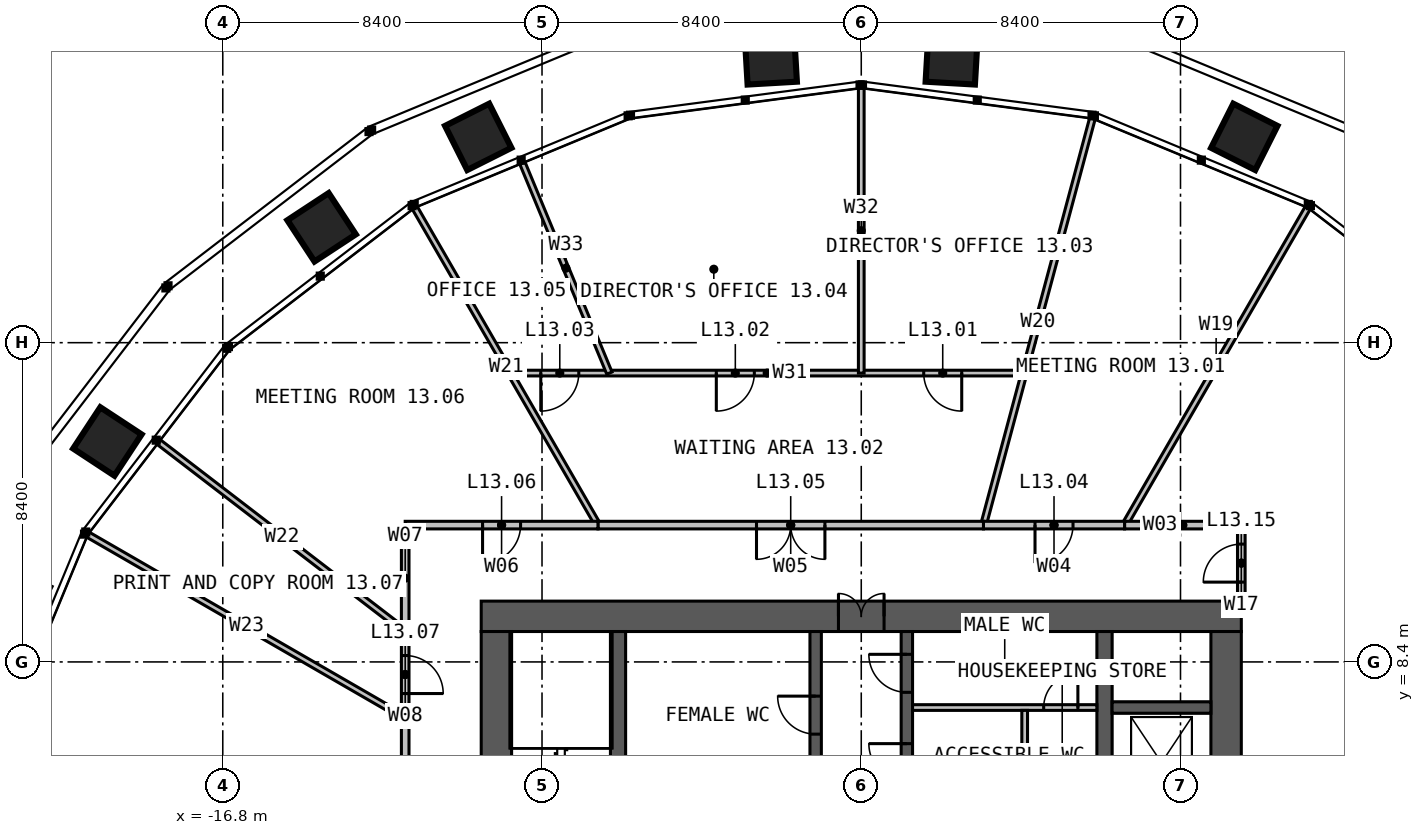
"""IFC4 building model, lengths in metres.
Left out: names, types, materials, properties, quantities, classifications, styles, units other than length and angle.
Written with IfcOpenShell. Run it as: python <this file> out.ifc"""

import sys

from ifc_helpers import new_model, si_unit, direction, frame, frame_2d, origin, place, context, subcontext, project, spatial, rectangle, extrude, element, fill, save


model = new_model("IFC4")
c1 = context("Model", 3, precision=1e-05, world=origin(), true_north=direction((0.0, 1.0)))
c2 = subcontext(c1, "Body", "Model", "MODEL_VIEW")
j1 = project(units=[si_unit("LENGTHUNIT", "METRE"), si_unit("PLANEANGLEUNIT", "RADIAN")], contexts=[c1])
p1 = place(None, origin())
s1 = spatial("IfcSite", under=j1, at=p1, CompositionType="ELEMENT")
p2 = place(p1, origin())
s2 = spatial("IfcBuilding", under=s1, at=p2, CompositionType="ELEMENT")
p3 = place(p2, frame((0.0, 0.0, 57.0)))
s3 = spatial("IfcBuildingStorey", under=s2, at=p3, CompositionType="ELEMENT", Elevation=57.0)
p4 = place(p3, frame((-10.0, 9.6, 0.0), z_axis=(0.0, 0.0, 1.0), x_axis=(1.0, 0.0, 0.0)))
e1 = element("IfcWall", 1, at=p4, inside=s3, PredefinedType="SOLIDWALL", context=c2, shape_type="SweptSolid", body=[
    extrude(rectangle(XDim=20.0, YDim=0.8, at=frame_2d((10.0, 0.0))), origin(), (0.0, 0.0, 1.0), 4.0),
])
p5 = place(p4, frame((9.4, 0.0, 0.0)))
e2 = element("IfcOpeningElement", 2, at=p5, cuts=e1, PredefinedType="OPENING", context=c2, shape_type="SweptSolid", body=[
    extrude(rectangle(XDim=1.2, YDim=2.2, at=frame_2d((0.6, 1.1))), frame((0.0, 0.41, 0.0), z_axis=(0.0, -1.0, 0.0), x_axis=(1.0, 0.0, 0.0)), (0.0, 0.0, 1.0), 0.82),
])
for number, where, z_axis, x_axis in (
    (3, (9.6, -9.2, 0.0), (0.0, 0.0, 1.0), (0.0, 1.0, 0.0)),
    (4, (-9.6, 9.2, 0.0), (0.0, 0.0, 1.0), (0.0, -1.0, 0.0)),
):
    element("IfcWall", number, at=place(p3, frame(where, z_axis=z_axis, x_axis=x_axis)), inside=s3, PredefinedType="SOLIDWALL", context=c2, shape_type="SweptSolid", body=[
        extrude(rectangle(XDim=18.4, YDim=0.8, at=frame_2d((9.2, 0.0))), origin(), (0.0, 0.0, 1.0), 4.0),
    ])
p6 = place(p3, frame((-6.4, -9.2, 0.0), z_axis=(0.0, 0.0, 1.0), x_axis=(0.0, 1.0, 0.0)))
e5 = element("IfcWall", 5, at=p6, inside=s3, PredefinedType="SOLIDWALL", context=c2, shape_type="SweptSolid", body=[
    extrude(rectangle(XDim=18.4, YDim=0.4, at=frame_2d((9.2, 0.0))), origin(), (0.0, 0.0, 1.0), 4.0),
])
p7 = place(p6, frame((8.7, 0.0, 0.0)))
e6 = element("IfcOpeningElement", 6, at=p7, cuts=e5, PredefinedType="OPENING", context=c2, shape_type="SweptSolid", body=[
    extrude(rectangle(XDim=1.0, YDim=2.2, at=frame_2d((0.5, 1.1))), frame((0.0, 0.21, 0.0), z_axis=(0.0, -1.0, 0.0), x_axis=(1.0, 0.0, 0.0)), (0.0, 0.0, 1.0), 0.42),
])
p8 = place(p3, frame((6.4, 9.2, 0.0), z_axis=(0.0, 0.0, 1.0), x_axis=(0.0, -1.0, 0.0)))
e7 = element("IfcWall", 7, at=p8, inside=s3, PredefinedType="SOLIDWALL", context=c2, shape_type="SweptSolid", body=[
    extrude(rectangle(XDim=18.4, YDim=0.4, at=frame_2d((9.2, 0.0))), origin(), (0.0, 0.0, 1.0), 4.0),
])
p9 = place(p8, frame((8.7, 0.0, 0.0)))
e8 = element("IfcOpeningElement", 8, at=p9, cuts=e7, PredefinedType="OPENING", context=c2, shape_type="SweptSolid", body=[
    extrude(rectangle(XDim=1.0, YDim=2.2, at=frame_2d((0.5, 1.1))), frame((0.0, 0.21, 0.0), z_axis=(0.0, -1.0, 0.0), x_axis=(1.0, 0.0, 0.0)), (0.0, 0.0, 1.0), 0.42),
])
p10 = place(p3, frame((-1.2, 1.45, 0.0), z_axis=(0.0, 0.0, 1.0), x_axis=(0.0, 1.0, 0.0)))
e9 = element("IfcWall", 9, at=p10, inside=s3, PredefinedType="SOLIDWALL", context=c2, shape_type="SweptSolid", body=[
    extrude(rectangle(XDim=7.75, YDim=0.3, at=frame_2d((3.875, 0.0))), origin(), (0.0, 0.0, 1.0), 4.0),
])
p11 = place(p10, frame((5.05, 0.0, 0.0)))
e10 = element("IfcOpeningElement", 10, at=p11, cuts=e9, PredefinedType="OPENING", context=c2, shape_type="SweptSolid", body=[
    extrude(rectangle(XDim=1.0, YDim=2.2, at=frame_2d((0.5, 1.1))), frame((0.0, 0.16, 0.0), z_axis=(0.0, -1.0, 0.0), x_axis=(1.0, 0.0, 0.0)), (0.0, 0.0, 1.0), 0.32),
])
p12 = place(p3, frame((1.2, 1.45, 0.0), z_axis=(0.0, 0.0, 1.0), x_axis=(0.0, 1.0, 0.0)))
e11 = element("IfcWall", 11, at=p12, inside=s3, PredefinedType="SOLIDWALL", context=c2, shape_type="SweptSolid", body=[
    extrude(rectangle(XDim=7.75, YDim=0.3, at=frame_2d((3.875, 0.0))), origin(), (0.0, 0.0, 1.0), 4.0),
])
p13 = place(p12, frame((3.8, 0.0, 0.0)))
e12 = element("IfcOpeningElement", 12, at=p13, cuts=e11, PredefinedType="OPENING", context=c2, shape_type="SweptSolid", body=[
    extrude(rectangle(XDim=1.0, YDim=2.2, at=frame_2d((0.5, 1.1))), frame((0.0, 0.16, 0.0), z_axis=(0.0, -1.0, 0.0), x_axis=(1.0, 0.0, 0.0)), (0.0, 0.0, 1.0), 0.32),
])
p14 = place(p12, frame((6.15, 0.0, 0.0)))
e13 = element("IfcOpeningElement", 13, at=p14, cuts=e11, PredefinedType="OPENING", context=c2, shape_type="SweptSolid", body=[
    extrude(rectangle(XDim=1.0, YDim=2.2, at=frame_2d((0.5, 1.1))), frame((0.0, 0.16, 0.0), z_axis=(0.0, -1.0, 0.0), x_axis=(1.0, 0.0, 0.0)), (0.0, 0.0, 1.0), 0.32),
])
p15 = place(p3, frame((6.6, 7.2, 0.0), z_axis=(0.0, 0.0, 1.0), x_axis=(1.0, 0.0, 0.0)))
e14 = element("IfcWall", 14, at=p15, inside=s3, PredefinedType="SOLIDWALL", context=c2, shape_type="SweptSolid", body=[
    extrude(rectangle(XDim=2.6, YDim=0.3, at=frame_2d((1.3, 0.0))), origin(), (0.0, 0.0, 1.0), 4.0),
])
p16 = place(p3, frame((1.35, 7.2, 0.0), z_axis=(0.0, 0.0, 1.0), x_axis=(1.0, 0.0, 0.0)))
e15 = element("IfcWall", 15, at=p16, inside=s3, PredefinedType="PARTITIONING", context=c2, shape_type="SweptSolid", body=[
    extrude(rectangle(XDim=4.85, YDim=0.15, at=frame_2d((2.425, 0.0))), origin(), (0.0, 0.0, 1.0), 3.75),
])
p17 = place(p16, frame((3.45, 0.0, 0.0)))
e16 = element("IfcOpeningElement", 16, at=p17, cuts=e15, PredefinedType="OPENING", context=c2, shape_type="SweptSolid", body=[
    extrude(rectangle(XDim=0.9, YDim=2.2, at=frame_2d((0.45, 1.1))), frame((0.0, 0.085, 0.0), z_axis=(0.0, -1.0, 0.0), x_axis=(1.0, 0.0, 0.0)), (0.0, 0.0, 1.0), 0.17),
])
p18 = place(p3, frame((4.3, 4.75, 0.0), z_axis=(0.0, 0.0, 1.0), x_axis=(0.0, 1.0, 0.0)))
e17 = element("IfcWall", 17, at=p18, inside=s3, PredefinedType="PARTITIONING", context=c2, shape_type="SweptSolid", body=[
    extrude(rectangle(XDim=2.375, YDim=0.15, at=frame_2d((1.188, 0.0))), origin(), (0.0, 0.0, 1.0), 3.75),
])
p19 = place(p3, frame((6.928, 12.0, 0.0), z_axis=(0.0, 0.0, 1.0), x_axis=(0.499991431567, 0.866030350715, 0.0)))
e18 = element("IfcWall", 18, at=p19, inside=s3, PredefinedType="PARTITIONING", context=c2, shape_type="SweptSolid", body=[
    extrude(rectangle(XDim=9.638, YDim=0.15, at=frame_2d((4.819, 0.0))), origin(), (0.0, 0.0, 1.0), 2.79),
])
p20 = place(p3, frame((3.215, 12.0, 0.0), z_axis=(0.0, 0.0, 1.0), x_axis=(0.258830514209, 0.965922753078, 0.0)))
e19 = element("IfcWall", 19, at=p20, inside=s3, PredefinedType="PARTITIONING", context=c2, shape_type="SweptSolid", body=[
    extrude(rectangle(XDim=11.071, YDim=0.15, at=frame_2d((5.535, 0.0))), origin(), (0.0, 0.0, 1.0), 2.79),
])
p21 = place(p3, frame((-6.928, 12.0, 0.0), z_axis=(0.0, 0.0, 1.0), x_axis=(-0.499991431567, 0.866030350715, 0.0)))
e20 = element("IfcWall", 20, at=p21, inside=s3, PredefinedType="PARTITIONING", context=c2, shape_type="SweptSolid", body=[
    extrude(rectangle(XDim=9.638, YDim=0.15, at=frame_2d((4.819, 0.0))), origin(), (0.0, 0.0, 1.0), 2.79),
])
p22 = place(p3, frame((-12.0, 9.208, 0.0), z_axis=(0.0, 0.0, 1.0), x_axis=(-0.793362371633, 0.608749658954, 0.0)))
e21 = element("IfcWall", 21, at=p22, inside=s3, PredefinedType="PARTITIONING", context=c2, shape_type="SweptSolid", body=[
    extrude(rectangle(XDim=8.167, YDim=0.15, at=frame_2d((4.084, 0.0))), origin(), (0.0, 0.0, 1.0), 2.79),
])
p23 = place(p3, frame((-12.0, 6.928, 0.0), z_axis=(0.0, 0.0, 1.0), x_axis=(-0.866030350715, 0.499991431567, 0.0)))
e22 = element("IfcWall", 22, at=p23, inside=s3, PredefinedType="PARTITIONING", context=c2, shape_type="SweptSolid", body=[
    extrude(rectangle(XDim=9.638, YDim=0.15, at=frame_2d((4.819, 0.0))), origin(), (0.0, 0.0, 1.0), 2.79),
])
p24 = place(p3, frame((10.0, 12.0, 0.0), z_axis=(0.0, 0.0, 1.0), x_axis=(-1.0, 0.0, 0.0)))
e23 = element("IfcWall", 23, at=p24, inside=s3, PredefinedType="PARTITIONING", context=c2, shape_type="SweptSolid", body=[
    extrude(rectangle(XDim=3.072, YDim=0.2, at=frame_2d((1.536, 0.0))), origin(), (0.0, 0.0, 1.0), 3.8),
])
p25 = place(p3, frame((6.928, 12.0, 0.0), z_axis=(0.0, 0.0, 1.0), x_axis=(-1.0, 0.0, 0.0)))
e24 = element("IfcWall", 24, at=p25, inside=s3, PredefinedType="PARTITIONING", context=c2, shape_type="SweptSolid", body=[
    extrude(rectangle(XDim=3.713, YDim=0.2, at=frame_2d((1.856, 0.0))), origin(), (0.0, 0.0, 1.0), 3.8),
])
p26 = place(p25, frame((1.356, 0.0, 0.0)))
e25 = element("IfcOpeningElement", 25, at=p26, cuts=e24, PredefinedType="OPENING", context=c2, shape_type="SweptSolid", body=[
    extrude(rectangle(XDim=1.0, YDim=2.2, at=frame_2d((0.5, 1.1))), frame((0.0, 0.11, 0.0), z_axis=(0.0, -1.0, 0.0), x_axis=(1.0, 0.0, 0.0)), (0.0, 0.0, 1.0), 0.22),
])
p27 = place(p3, frame((4.287, 16.0, 0.0), z_axis=(0.0, 0.0, 1.0), x_axis=(-1.0, 0.0, 0.0)))
e26 = element("IfcWall", 26, at=p27, inside=s3, PredefinedType="PARTITIONING", context=c2, shape_type="SweptSolid", body=[
    extrude(rectangle(XDim=13.525, YDim=0.15, at=frame_2d((6.762, 0.0))), origin(), (0.0, 0.0, 1.0), 2.79),
])
p28 = place(p27, frame((1.644, 0.0, 0.0)))
e27 = element("IfcOpeningElement", 27, at=p28, cuts=e26, PredefinedType="OPENING", context=c2, shape_type="SweptSolid", body=[
    extrude(rectangle(XDim=1.0, YDim=2.2, at=frame_2d((0.5, 1.1))), frame((0.0, 0.085, 0.0), z_axis=(0.0, -1.0, 0.0), x_axis=(1.0, 0.0, 0.0)), (0.0, 0.0, 1.0), 0.17),
])
p29 = place(p27, frame((7.101, 0.0, 0.0)))
e28 = element("IfcOpeningElement", 28, at=p29, cuts=e26, PredefinedType="OPENING", context=c2, shape_type="SweptSolid", body=[
    extrude(rectangle(XDim=1.0, YDim=2.2, at=frame_2d((0.5, 1.1))), frame((0.0, 0.085, 0.0), z_axis=(0.0, -1.0, 0.0), x_axis=(1.0, 0.0, 0.0)), (0.0, 0.0, 1.0), 0.17),
])
p30 = place(p27, frame((11.72, 0.0, 0.0)))
e29 = element("IfcOpeningElement", 29, at=p30, cuts=e26, PredefinedType="OPENING", context=c2, shape_type="SweptSolid", body=[
    extrude(rectangle(XDim=1.0, YDim=2.2, at=frame_2d((0.5, 1.1))), frame((0.0, 0.085, 0.0), z_axis=(0.0, -1.0, 0.0), x_axis=(1.0, 0.0, 0.0)), (0.0, 0.0, 1.0), 0.17),
])
p31 = place(p3, frame((0.0, 16.0, 0.0), z_axis=(0.0, 0.0, 1.0), x_axis=(0.0, 1.0, 0.0)))
e30 = element("IfcWall", 30, at=p31, inside=s3, PredefinedType="PARTITIONING", context=c2, shape_type="SweptSolid", body=[
    extrude(rectangle(XDim=7.494, YDim=0.15, at=frame_2d((3.747, 0.0))), origin(), (0.0, 0.0, 1.0), 2.79),
])
p32 = place(p3, frame((-6.627, 16.0, 0.0), z_axis=(0.0, 0.0, 1.0), x_axis=(-0.382670574825, 0.923884858174, 0.0)))
e31 = element("IfcWall", 31, at=p32, inside=s3, PredefinedType="PARTITIONING", context=c2, shape_type="SweptSolid", body=[
    extrude(rectangle(XDim=5.975, YDim=0.15, at=frame_2d((2.987, 0.0))), origin(), (0.0, 0.0, 1.0), 2.79),
])
p33 = place(p3, frame((3.215, 12.0, 0.0), z_axis=(0.0, 0.0, 1.0), x_axis=(-1.0, 0.0, 0.0)))
e32 = element("IfcWall", 32, at=p33, inside=s3, PredefinedType="PARTITIONING", context=c2, shape_type="SweptSolid", body=[
    extrude(rectangle(XDim=10.144, YDim=0.2, at=frame_2d((5.072, 0.0))), origin(), (0.0, 0.0, 1.0), 3.8),
])
p34 = place(p33, frame((4.172, 0.0, 0.0)))
e33 = element("IfcOpeningElement", 33, at=p34, cuts=e32, PredefinedType="OPENING", context=c2, shape_type="SweptSolid", body=[
    extrude(rectangle(XDim=1.8, YDim=2.2, at=frame_2d((0.9, 1.1))), frame((0.0, 0.11, 0.0), z_axis=(0.0, -1.0, 0.0), x_axis=(1.0, 0.0, 0.0)), (0.0, 0.0, 1.0), 0.22),
])
p35 = place(p3, frame((-6.928, 12.0, 0.0), z_axis=(0.0, 0.0, 1.0), x_axis=(-1.0, 0.0, 0.0)))
e34 = element("IfcWall", 34, at=p35, inside=s3, PredefinedType="PARTITIONING", context=c2, shape_type="SweptSolid", body=[
    extrude(rectangle(XDim=5.072, YDim=0.2, at=frame_2d((2.536, 0.0))), origin(), (0.0, 0.0, 1.0), 3.8),
])
p36 = place(p35, frame((2.036, 0.0, 0.0)))
e35 = element("IfcOpeningElement", 35, at=p36, cuts=e34, PredefinedType="OPENING", context=c2, shape_type="SweptSolid", body=[
    extrude(rectangle(XDim=1.0, YDim=2.2, at=frame_2d((0.5, 1.1))), frame((0.0, 0.11, 0.0), z_axis=(0.0, -1.0, 0.0), x_axis=(1.0, 0.0, 0.0)), (0.0, 0.0, 1.0), 0.22),
])
p37 = place(p3, frame((-12.0, 12.0, 0.0), z_axis=(0.0, 0.0, 1.0), x_axis=(0.0, -1.0, 0.0)))
e36 = element("IfcWall", 36, at=p37, inside=s3, PredefinedType="PARTITIONING", context=c2, shape_type="SweptSolid", body=[
    extrude(rectangle(XDim=2.792, YDim=0.2, at=frame_2d((1.396, 0.0))), origin(), (0.0, 0.0, 1.0), 3.8),
])
p38 = place(p3, frame((-12.0, 9.208, 0.0), z_axis=(0.0, 0.0, 1.0), x_axis=(0.0, -1.0, 0.0)))
e37 = element("IfcWall", 37, at=p38, inside=s3, PredefinedType="PARTITIONING", context=c2, shape_type="SweptSolid", body=[
    extrude(rectangle(XDim=2.28, YDim=0.2, at=frame_2d((1.14, 0.0))), origin(), (0.0, 0.0, 1.0), 3.8),
])
p39 = place(p38, frame((0.64, 0.0, 0.0)))
e38 = element("IfcOpeningElement", 38, at=p39, cuts=e37, PredefinedType="OPENING", context=c2, shape_type="SweptSolid", body=[
    extrude(rectangle(XDim=1.0, YDim=2.2, at=frame_2d((0.5, 1.1))), frame((0.0, 0.11, 0.0), z_axis=(0.0, -1.0, 0.0), x_axis=(1.0, 0.0, 0.0)), (0.0, 0.0, 1.0), 0.22),
])
p40 = place(p3, frame((-12.0, 6.928, 0.0), z_axis=(0.0, 0.0, 1.0), x_axis=(0.0, -1.0, 0.0)))
e39 = element("IfcWall", 39, at=p40, inside=s3, PredefinedType="PARTITIONING", context=c2, shape_type="SweptSolid", body=[
    extrude(rectangle(XDim=8.508, YDim=0.2, at=frame_2d((4.254, 0.0))), origin(), (0.0, 0.0, 1.0), 3.8),
])
p41 = place(p40, frame((3.754, 0.0, 0.0)))
e40 = element("IfcOpeningElement", 40, at=p41, cuts=e39, PredefinedType="OPENING", context=c2, shape_type="SweptSolid", body=[
    extrude(rectangle(XDim=1.0, YDim=2.2, at=frame_2d((0.5, 1.1))), frame((0.0, 0.11, 0.0), z_axis=(0.0, -1.0, 0.0), x_axis=(1.0, 0.0, 0.0)), (0.0, 0.0, 1.0), 0.22),
])
p42 = place(p3, frame((10.0, 10.0, 0.0), z_axis=(0.0, 0.0, 1.0), x_axis=(0.0, 1.0, 0.0)))
e41 = element("IfcWall", 41, at=p42, inside=s3, PredefinedType="PARTITIONING", context=c2, shape_type="SweptSolid", body=[
    extrude(rectangle(XDim=2.0, YDim=0.2, at=frame_2d((1.0, 0.0))), origin(), (0.0, 0.0, 1.0), 3.8),
])
p43 = place(p42, frame((0.5, 0.0, 0.0)))
e42 = element("IfcOpeningElement", 42, at=p43, cuts=e41, PredefinedType="OPENING", context=c2, shape_type="SweptSolid", body=[
    extrude(rectangle(XDim=1.0, YDim=2.2, at=frame_2d((0.5, 1.1))), frame((0.0, 0.11, 0.0), z_axis=(0.0, -1.0, 0.0), x_axis=(1.0, 0.0, 0.0)), (0.0, 0.0, 1.0), 0.22),
])
p44 = place(p5, origin())
e43 = element("IfcDoor", 43, at=p44, inside=s3, OperationType="DOUBLE_DOOR_SINGLE_SWING", PredefinedType="DOOR", context=c2, shape_type="SweptSolid", body=[
    extrude(rectangle(XDim=1.2, YDim=2.2, at=frame_2d((0.6, 1.1))), frame((0.0, 0.025, 0.0), z_axis=(0.0, -1.0, 0.0), x_axis=(1.0, 0.0, 0.0)), (0.0, 0.0, 1.0), 0.05),
])
fill(e2, e43)
p45 = place(p11, origin())
e44 = element("IfcDoor", 44, at=p45, inside=s3, OperationType="SINGLE_SWING_RIGHT", PredefinedType="DOOR", context=c2, shape_type="SweptSolid", body=[
    extrude(rectangle(XDim=1.0, YDim=2.2, at=frame_2d((0.5, 1.1))), frame((0.0, 0.025, 0.0), z_axis=(0.0, -1.0, 0.0), x_axis=(1.0, 0.0, 0.0)), (0.0, 0.0, 1.0), 0.05),
])
fill(e10, e44)
p46 = place(p13, origin())
e45 = element("IfcDoor", 45, at=p46, inside=s3, OperationType="SINGLE_SWING_RIGHT", PredefinedType="DOOR", context=c2, shape_type="SweptSolid", body=[
    extrude(rectangle(XDim=1.0, YDim=2.2, at=frame_2d((0.5, 1.1))), frame((0.0, 0.025, 0.0), z_axis=(0.0, -1.0, 0.0), x_axis=(1.0, 0.0, 0.0)), (0.0, 0.0, 1.0), 0.05),
])
fill(e12, e45)
p47 = place(p14, origin())
e46 = element("IfcDoor", 46, at=p47, inside=s3, OperationType="SINGLE_SWING_RIGHT", PredefinedType="DOOR", context=c2, shape_type="SweptSolid", body=[
    extrude(rectangle(XDim=1.0, YDim=2.2, at=frame_2d((0.5, 1.1))), frame((0.0, 0.025, 0.0), z_axis=(0.0, -1.0, 0.0), x_axis=(1.0, 0.0, 0.0)), (0.0, 0.0, 1.0), 0.05),
])
fill(e13, e46)
p48 = place(p17, origin())
e47 = element("IfcDoor", 47, at=p48, inside=s3, OperationType="SINGLE_SWING_RIGHT", PredefinedType="DOOR", context=c2, shape_type="SweptSolid", body=[
    extrude(rectangle(XDim=0.9, YDim=2.2, at=frame_2d((0.45, 1.1))), frame((0.0, 0.025, 0.0), z_axis=(0.0, -1.0, 0.0), x_axis=(1.0, 0.0, 0.0)), (0.0, 0.0, 1.0), 0.05),
])
fill(e16, e47)
p49 = place(p26, origin())
e48 = element("IfcDoor", 48, at=p49, inside=s3, OperationType="SINGLE_SWING_RIGHT", PredefinedType="DOOR", context=c2, shape_type="SweptSolid", body=[
    extrude(rectangle(XDim=1.0, YDim=2.2, at=frame_2d((0.5, 1.1))), frame((0.0, 0.025, 0.0), z_axis=(0.0, -1.0, 0.0), x_axis=(1.0, 0.0, 0.0)), (0.0, 0.0, 1.0), 0.05),
])
fill(e25, e48)
p50 = place(p28, origin())
e49 = element("IfcDoor", 49, at=p50, inside=s3, OperationType="SINGLE_SWING_LEFT", PredefinedType="DOOR", context=c2, shape_type="SweptSolid", body=[
    extrude(rectangle(XDim=1.0, YDim=2.2, at=frame_2d((0.5, 1.1))), frame((0.0, 0.025, 0.0), z_axis=(0.0, -1.0, 0.0), x_axis=(1.0, 0.0, 0.0)), (0.0, 0.0, 1.0), 0.05),
])
fill(e27, e49)
p51 = place(p29, origin())
e50 = element("IfcDoor", 50, at=p51, inside=s3, OperationType="SINGLE_SWING_RIGHT", PredefinedType="DOOR", context=c2, shape_type="SweptSolid", body=[
    extrude(rectangle(XDim=1.0, YDim=2.2, at=frame_2d((0.5, 1.1))), frame((0.0, 0.025, 0.0), z_axis=(0.0, -1.0, 0.0), x_axis=(1.0, 0.0, 0.0)), (0.0, 0.0, 1.0), 0.05),
])
fill(e28, e50)
p52 = place(p30, origin())
e51 = element("IfcDoor", 51, at=p52, inside=s3, OperationType="SINGLE_SWING_RIGHT", PredefinedType="DOOR", context=c2, shape_type="SweptSolid", body=[
    extrude(rectangle(XDim=1.0, YDim=2.2, at=frame_2d((0.5, 1.1))), frame((0.0, 0.025, 0.0), z_axis=(0.0, -1.0, 0.0), x_axis=(1.0, 0.0, 0.0)), (0.0, 0.0, 1.0), 0.05),
])
fill(e29, e51)
p53 = place(p34, origin())
e52 = element("IfcDoor", 52, at=p53, inside=s3, OperationType="DOUBLE_DOOR_SINGLE_SWING", PredefinedType="DOOR", context=c2, shape_type="SweptSolid", body=[
    extrude(rectangle(XDim=1.8, YDim=2.2, at=frame_2d((0.9, 1.1))), frame((0.0, 0.025, 0.0), z_axis=(0.0, -1.0, 0.0), x_axis=(1.0, 0.0, 0.0)), (0.0, 0.0, 1.0), 0.05),
])
fill(e33, e52)
p54 = place(p36, origin())
e53 = element("IfcDoor", 53, at=p54, inside=s3, OperationType="SINGLE_SWING_RIGHT", PredefinedType="DOOR", context=c2, shape_type="SweptSolid", body=[
    extrude(rectangle(XDim=1.0, YDim=2.2, at=frame_2d((0.5, 1.1))), frame((0.0, 0.025, 0.0), z_axis=(0.0, -1.0, 0.0), x_axis=(1.0, 0.0, 0.0)), (0.0, 0.0, 1.0), 0.05),
])
fill(e35, e53)
p55 = place(p39, origin())
e54 = element("IfcDoor", 54, at=p55, inside=s3, OperationType="SINGLE_SWING_RIGHT", PredefinedType="DOOR", context=c2, shape_type="SweptSolid", body=[
    extrude(rectangle(XDim=1.0, YDim=2.2, at=frame_2d((0.5, 1.1))), frame((0.0, 0.025, 0.0), z_axis=(0.0, -1.0, 0.0), x_axis=(1.0, 0.0, 0.0)), (0.0, 0.0, 1.0), 0.05),
])
fill(e38, e54)
p56 = place(p43, origin())
e55 = element("IfcDoor", 55, at=p56, inside=s3, OperationType="SINGLE_SWING_LEFT", PredefinedType="DOOR", context=c2, shape_type="SweptSolid", body=[
    extrude(rectangle(XDim=1.0, YDim=2.2, at=frame_2d((0.5, 1.1))), frame((0.0, 0.025, 0.0), z_axis=(0.0, -1.0, 0.0), x_axis=(1.0, 0.0, 0.0)), (0.0, 0.0, 1.0), 0.05),
])
fill(e42, e55)
save(model, sys.argv[1])
